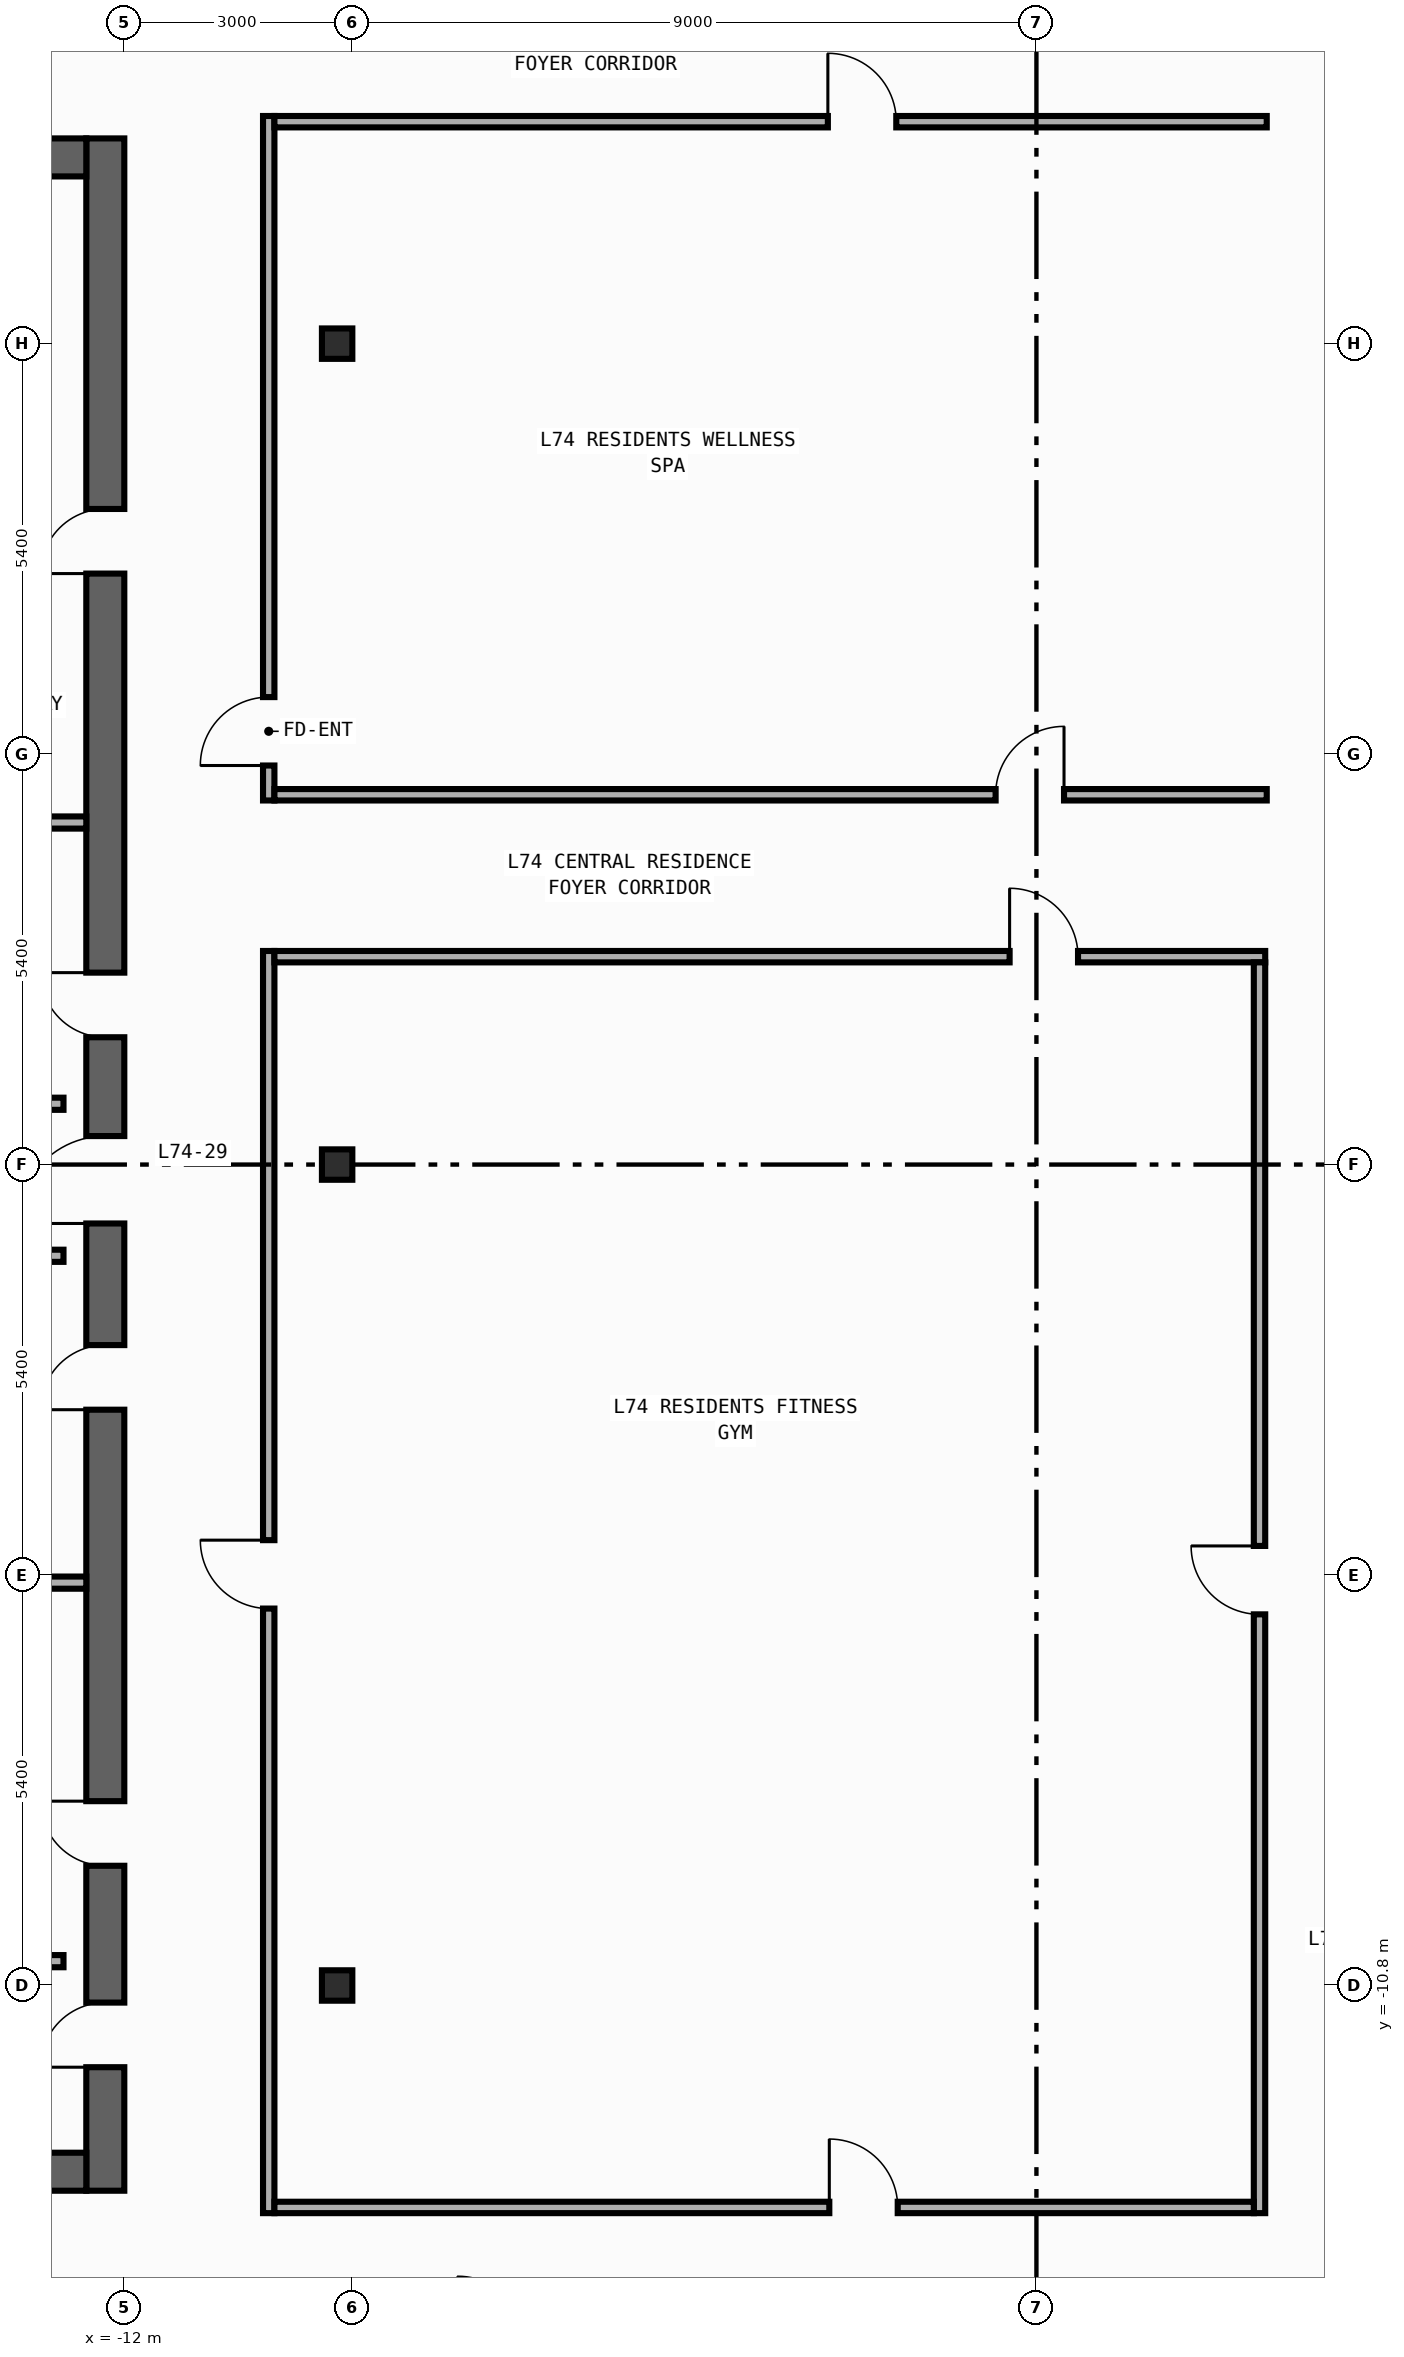
"""IFC4 building model, lengths in metres.
Left out: names, types, materials, properties, quantities, classifications, styles, units other than length and angle.
Written with IfcOpenShell. Run it as: python <this file> out.ifc"""

import sys

from ifc_helpers import new_model, si_unit, direction, frame, frame_2d, origin, origin_2d, place, context, subcontext, project, spatial, rectangle, i_section, extrude, element, fill, save


model = new_model("IFC4")
c1 = context("Model", 3, precision=1e-05, world=origin(), true_north=direction((0.0, 1.0)))
c2 = subcontext(c1, "Body", "Model", "MODEL_VIEW")
j1 = project(units=[si_unit("LENGTHUNIT", "METRE"), si_unit("PLANEANGLEUNIT", "RADIAN")], contexts=[c1])
p1 = place(None, origin())
s1 = spatial("IfcSite", under=j1, at=p1, CompositionType="ELEMENT")
p2 = place(p1, origin())
s2 = spatial("IfcBuilding", under=s1, at=p2, CompositionType="ELEMENT")
p3 = place(p2, frame((0.0, 0.0, 308.0)))
s3 = spatial("IfcBuildingStorey", under=s2, at=p3, CompositionType="ELEMENT", Elevation=308.0)
p4 = place(p3, frame((-12.25, -13.5, 0.0), z_axis=(0.0, 0.0, 1.0), x_axis=(0.0, 1.0, 0.0)))
e1 = element("IfcWall", 1, at=p4, inside=s3, PredefinedType="SHEAR", context=c2, shape_type="SweptSolid", body=[
    extrude(rectangle(XDim=27.0, YDim=0.5, at=frame_2d((13.5, 0.0))), origin(), (0.0, 0.0, 1.0), 3.54),
])
p5 = place(p4, frame((15.175, 0.0, 0.0)))
e2 = element("IfcOpeningElement", 2, at=p5, cuts=e1, PredefinedType="OPENING", context=c2, shape_type="SweptSolid", body=[
    extrude(rectangle(XDim=0.85, YDim=2.1, at=frame_2d((0.425, 1.05))), frame((0.0, 0.26, 0.0), z_axis=(0.0, -1.0, 0.0), x_axis=(1.0, 0.0, 0.0)), (0.0, 0.0, 1.0), 0.52),
])
p6 = place(p4, frame((21.275, 0.0, 0.0)))
e3 = element("IfcOpeningElement", 3, at=p6, cuts=e1, PredefinedType="OPENING", context=c2, shape_type="SweptSolid", body=[
    extrude(rectangle(XDim=0.85, YDim=2.1, at=frame_2d((0.425, 1.05))), frame((0.0, 0.26, 0.0), z_axis=(0.0, -1.0, 0.0), x_axis=(1.0, 0.0, 0.0)), (0.0, 0.0, 1.0), 0.52),
])
p7 = place(p4, frame((4.275, 0.0, 0.0)))
e4 = element("IfcOpeningElement", 4, at=p7, cuts=e1, PredefinedType="OPENING", context=c2, shape_type="SweptSolid", body=[
    extrude(rectangle(XDim=0.85, YDim=2.1, at=frame_2d((0.425, 1.05))), frame((0.0, 0.26, 0.0), z_axis=(0.0, -1.0, 0.0), x_axis=(1.0, 0.0, 0.0)), (0.0, 0.0, 1.0), 0.52),
])
p8 = place(p4, frame((10.275, 0.0, 0.0)))
e5 = element("IfcOpeningElement", 5, at=p8, cuts=e1, PredefinedType="OPENING", context=c2, shape_type="SweptSolid", body=[
    extrude(rectangle(XDim=0.85, YDim=2.1, at=frame_2d((0.425, 1.05))), frame((0.0, 0.26, 0.0), z_axis=(0.0, -1.0, 0.0), x_axis=(1.0, 0.0, 0.0)), (0.0, 0.0, 1.0), 0.52),
])
p9 = place(p4, frame((12.725, 0.0, 0.0)))
e6 = element("IfcOpeningElement", 6, at=p9, cuts=e1, PredefinedType="OPENING", context=c2, shape_type="SweptSolid", body=[
    extrude(rectangle(XDim=1.15, YDim=2.2, at=frame_2d((0.575, 1.1))), frame((0.0, 0.26, 0.0), z_axis=(0.0, -1.0, 0.0), x_axis=(1.0, 0.0, 0.0)), (0.0, 0.0, 1.0), 0.52),
])
p10 = place(p4, frame((1.625, 0.0, 0.0)))
e7 = element("IfcOpeningElement", 7, at=p10, cuts=e1, PredefinedType="OPENING", context=c2, shape_type="SweptSolid", body=[
    extrude(rectangle(XDim=0.85, YDim=2.1, at=frame_2d((0.425, 1.05))), frame((0.0, 0.26, 0.0), z_axis=(0.0, -1.0, 0.0), x_axis=(1.0, 0.0, 0.0)), (0.0, 0.0, 1.0), 0.52),
])
for number, where, z_axis, x_axis in (
    (8, (-19.9, -13.25, 0.0), (0.0, 0.0, 1.0), (1.0, 0.0, 0.0)),
    (9, (-19.9, 13.25, 0.0), (0.0, 0.0, 1.0), (1.0, 0.0, 0.0)),
):
    element("IfcWall", number, at=place(p3, frame(where, z_axis=z_axis, x_axis=x_axis)), inside=s3, PredefinedType="SHEAR", context=c2, shape_type="SweptSolid", body=[
        extrude(rectangle(XDim=7.4, YDim=0.5, at=frame_2d((3.7, 0.0))), origin(), (0.0, 0.0, 1.0), 3.54),
    ])
for number, where, z_axis, x_axis in (
    (10, (-9.2, -10.8, 0.0), (0.0, 0.0, 1.0), (1.0, 0.0, 0.0)),
    (11, (-9.2, 0.0, 0.0), (0.0, 0.0, 1.0), (1.0, 0.0, 0.0)),
    (12, (-9.2, 10.8, 0.0), (0.0, 0.0, 1.0), (1.0, 0.0, 0.0)),
):
    element("IfcColumn", number, at=place(p3, frame(where, z_axis=z_axis, x_axis=x_axis)), inside=s3, PredefinedType="COLUMN", context=c2, shape_type="SweptSolid", body=[
        extrude(i_section(OverallWidth=0.4, OverallDepth=0.4, WebThickness=0.013, FlangeThickness=0.021, FilletRadius=0.022, at=origin_2d()), origin(), (0.0, 0.0, 1.0), 3.8),
    ])
for number, where, z_axis, x_axis in (
    (13, (-15.4, 0.8, 0.0), (0.0, 0.0, 1.0), (1.0, 0.0, 0.0)),
    (14, (-15.4, -1.2, 0.0), (0.0, 0.0, 1.0), (1.0, 0.0, 0.0)),
    (15, (-15.4, -10.48, 0.0), (0.0, 0.0, 1.0), (1.0, 0.0, 0.0)),
):
    element("IfcWall", number, at=place(p3, frame(where, z_axis=z_axis, x_axis=x_axis)), inside=s3, PredefinedType="STANDARD", context=c2, shape_type="SweptSolid", body=[
        extrude(rectangle(XDim=2.6, YDim=0.16, at=frame_2d((1.3, 0.0))), origin(), (0.0, 0.0, 1.0), 3.54),
    ])
for number, where, z_axis, x_axis in (
    (16, (-15.4, 4.5, 0.0), (0.0, 0.0, 1.0), (1.0, 0.0, 0.0)),
    (17, (-15.4, -5.5, 0.0), (0.0, 0.0, 1.0), (1.0, 0.0, 0.0)),
):
    element("IfcWall", number, at=place(p3, frame(where, z_axis=z_axis, x_axis=x_axis)), inside=s3, PredefinedType="PARTITIONING", context=c2, shape_type="SweptSolid", body=[
        extrude(rectangle(XDim=2.9, YDim=0.16, at=frame_2d((1.45, 0.0))), origin(), (0.0, 0.0, 1.0), 3.54),
    ])
p11 = place(p3, frame((-10.1, 4.79, 0.0), z_axis=(0.0, 0.0, 1.0), x_axis=(0.0, 1.0, 0.0)))
e18 = element("IfcWall", 18, at=p11, inside=s3, PredefinedType="PARTITIONING", context=c2, shape_type="SweptSolid", body=[
    extrude(rectangle(XDim=9.005, YDim=0.15, at=frame_2d((4.502, 0.0))), origin(), (0.0, 0.0, 1.0), 3.54),
])
p12 = place(p11, frame((0.46, 0.0, 0.0)))
e19 = element("IfcOpeningElement", 19, at=p12, cuts=e18, PredefinedType="OPENING", context=c2, shape_type="SweptSolid", body=[
    extrude(rectangle(XDim=0.9, YDim=2.15, at=frame_2d((0.45, 1.075))), frame((0.0, 0.085, 0.0), z_axis=(0.0, -1.0, 0.0), x_axis=(1.0, 0.0, 0.0)), (0.0, 0.0, 1.0), 0.17),
])
p13 = place(p3, frame((-10.1, -13.795, 0.0), z_axis=(0.0, 0.0, 1.0), x_axis=(0.0, 1.0, 0.0)))
e20 = element("IfcWall", 20, at=p13, inside=s3, PredefinedType="PARTITIONING", context=c2, shape_type="SweptSolid", body=[
    extrude(rectangle(XDim=16.605, YDim=0.15, at=frame_2d((8.302, 0.0))), origin(), (0.0, 0.0, 1.0), 3.54),
])
p14 = place(p13, frame((7.954, 0.0, 0.0)))
e21 = element("IfcOpeningElement", 21, at=p14, cuts=e20, PredefinedType="OPENING", context=c2, shape_type="SweptSolid", body=[
    extrude(rectangle(XDim=0.9, YDim=2.15, at=frame_2d((0.45, 1.075))), frame((0.0, 0.085, 0.0), z_axis=(0.0, -1.0, 0.0), x_axis=(1.0, 0.0, 0.0)), (0.0, 0.0, 1.0), 0.17),
])
p15 = place(p3, frame((-10.025, 4.865, 0.0), z_axis=(0.0, 0.0, 1.0), x_axis=(1.0, 0.0, 0.0)))
e22 = element("IfcWall", 22, at=p15, inside=s3, PredefinedType="PARTITIONING", context=c2, shape_type="SweptSolid", body=[
    extrude(rectangle(XDim=13.055, YDim=0.15, at=frame_2d((6.527, 0.0))), origin(), (0.0, 0.0, 1.0), 3.54),
])
p16 = place(p15, frame((9.488, 0.0, 0.0)))
e23 = element("IfcOpeningElement", 23, at=p16, cuts=e22, PredefinedType="OPENING", context=c2, shape_type="SweptSolid", body=[
    extrude(rectangle(XDim=0.9, YDim=2.15, at=frame_2d((0.45, 1.075))), frame((0.0, 0.085, 0.0), z_axis=(0.0, -1.0, 0.0), x_axis=(1.0, 0.0, 0.0)), (0.0, 0.0, 1.0), 0.17),
])
p17 = place(p3, frame((-10.025, 2.735, 0.0), z_axis=(0.0, 0.0, 1.0), x_axis=(1.0, 0.0, 0.0)))
e24 = element("IfcWall", 24, at=p17, inside=s3, PredefinedType="PARTITIONING", context=c2, shape_type="SweptSolid", body=[
    extrude(rectangle(XDim=13.035, YDim=0.15, at=frame_2d((6.518, 0.0))), origin(), (0.0, 0.0, 1.0), 3.54),
])
p18 = place(p17, frame((9.672, 0.0, 0.0)))
e25 = element("IfcOpeningElement", 25, at=p18, cuts=e24, PredefinedType="OPENING", context=c2, shape_type="SweptSolid", body=[
    extrude(rectangle(XDim=0.9, YDim=2.15, at=frame_2d((0.45, 1.075))), frame((0.0, 0.085, 0.0), z_axis=(0.0, -1.0, 0.0), x_axis=(1.0, 0.0, 0.0)), (0.0, 0.0, 1.0), 0.17),
])
p19 = place(p3, frame((2.935, -13.795, 0.0), z_axis=(0.0, 0.0, 1.0), x_axis=(0.0, 1.0, 0.0)))
e26 = element("IfcWall", 26, at=p19, inside=s3, PredefinedType="PARTITIONING", context=c2, shape_type="SweptSolid", body=[
    extrude(rectangle(XDim=16.455, YDim=0.15, at=frame_2d((8.228, 0.0))), origin(), (0.0, 0.0, 1.0), 3.54),
])
p20 = place(p19, frame((7.878, 0.0, 0.0)))
e27 = element("IfcOpeningElement", 27, at=p20, cuts=e26, PredefinedType="OPENING", context=c2, shape_type="SweptSolid", body=[
    extrude(rectangle(XDim=0.9, YDim=2.15, at=frame_2d((0.45, 1.075))), frame((0.0, 0.085, 0.0), z_axis=(0.0, -1.0, 0.0), x_axis=(1.0, 0.0, 0.0)), (0.0, 0.0, 1.0), 0.17),
])
p21 = place(p3, frame((-10.025, 13.72, 0.0), z_axis=(0.0, 0.0, 1.0), x_axis=(1.0, 0.0, 0.0)))
e28 = element("IfcWall", 28, at=p21, inside=s3, PredefinedType="PARTITIONING", context=c2, shape_type="SweptSolid", body=[
    extrude(rectangle(XDim=13.055, YDim=0.15, at=frame_2d((6.527, 0.0))), origin(), (0.0, 0.0, 1.0), 3.54),
])
p22 = place(p21, frame((7.281, 0.0, 0.0)))
e29 = element("IfcOpeningElement", 29, at=p22, cuts=e28, PredefinedType="OPENING", context=c2, shape_type="SweptSolid", body=[
    extrude(rectangle(XDim=0.9, YDim=2.15, at=frame_2d((0.45, 1.075))), frame((0.0, 0.085, 0.0), z_axis=(0.0, -1.0, 0.0), x_axis=(1.0, 0.0, 0.0)), (0.0, 0.0, 1.0), 0.17),
])
p23 = place(p3, frame((-10.025, -13.72, 0.0), z_axis=(0.0, 0.0, 1.0), x_axis=(1.0, 0.0, 0.0)))
e30 = element("IfcWall", 30, at=p23, inside=s3, PredefinedType="PARTITIONING", context=c2, shape_type="SweptSolid", body=[
    extrude(rectangle(XDim=12.885, YDim=0.15, at=frame_2d((6.442, 0.0))), origin(), (0.0, 0.0, 1.0), 3.54),
])
p24 = place(p23, frame((7.3, 0.0, 0.0)))
e31 = element("IfcOpeningElement", 31, at=p24, cuts=e30, PredefinedType="OPENING", context=c2, shape_type="SweptSolid", body=[
    extrude(rectangle(XDim=0.9, YDim=2.15, at=frame_2d((0.45, 1.075))), frame((0.0, 0.085, 0.0), z_axis=(0.0, -1.0, 0.0), x_axis=(1.0, 0.0, 0.0)), (0.0, 0.0, 1.0), 0.17),
])
p25 = place(p5, origin())
e32 = element("IfcDoor", 32, at=p25, inside=s3, OperationType="SINGLE_SWING_RIGHT", PredefinedType="DOOR", context=c2, shape_type="SweptSolid", body=[
    extrude(rectangle(XDim=0.85, YDim=2.1, at=frame_2d((0.425, 1.05))), frame((0.0, 0.025, 0.0), z_axis=(0.0, -1.0, 0.0), x_axis=(1.0, 0.0, 0.0)), (0.0, 0.0, 1.0), 0.05),
])
fill(e2, e32)
p26 = place(p6, origin())
e33 = element("IfcDoor", 33, at=p26, inside=s3, OperationType="SINGLE_SWING_LEFT", PredefinedType="DOOR", context=c2, shape_type="SweptSolid", body=[
    extrude(rectangle(XDim=0.85, YDim=2.1, at=frame_2d((0.425, 1.05))), frame((0.0, 0.025, 0.0), z_axis=(0.0, -1.0, 0.0), x_axis=(1.0, 0.0, 0.0)), (0.0, 0.0, 1.0), 0.05),
])
fill(e3, e33)
p27 = place(p7, origin())
e34 = element("IfcDoor", 34, at=p27, inside=s3, OperationType="SINGLE_SWING_RIGHT", PredefinedType="DOOR", context=c2, shape_type="SweptSolid", body=[
    extrude(rectangle(XDim=0.85, YDim=2.1, at=frame_2d((0.425, 1.05))), frame((0.0, 0.025, 0.0), z_axis=(0.0, -1.0, 0.0), x_axis=(1.0, 0.0, 0.0)), (0.0, 0.0, 1.0), 0.05),
])
fill(e4, e34)
p28 = place(p8, origin())
e35 = element("IfcDoor", 35, at=p28, inside=s3, OperationType="SINGLE_SWING_LEFT", PredefinedType="DOOR", context=c2, shape_type="SweptSolid", body=[
    extrude(rectangle(XDim=0.85, YDim=2.1, at=frame_2d((0.425, 1.05))), frame((0.0, 0.025, 0.0), z_axis=(0.0, -1.0, 0.0), x_axis=(1.0, 0.0, 0.0)), (0.0, 0.0, 1.0), 0.05),
])
fill(e5, e35)
p29 = place(p9, origin())
e36 = element("IfcDoor", 36, at=p29, inside=s3, OperationType="SINGLE_SWING_LEFT", PredefinedType="DOOR", context=c2, shape_type="SweptSolid", body=[
    extrude(rectangle(XDim=1.15, YDim=2.2, at=frame_2d((0.575, 1.1))), frame((0.0, 0.025, 0.0), z_axis=(0.0, -1.0, 0.0), x_axis=(1.0, 0.0, 0.0)), (0.0, 0.0, 1.0), 0.05),
])
fill(e6, e36)
p30 = place(p10, origin())
e37 = element("IfcDoor", 37, at=p30, inside=s3, OperationType="SINGLE_SWING_LEFT", PredefinedType="DOOR", context=c2, shape_type="SweptSolid", body=[
    extrude(rectangle(XDim=0.85, YDim=2.1, at=frame_2d((0.425, 1.05))), frame((0.0, 0.025, 0.0), z_axis=(0.0, -1.0, 0.0), x_axis=(1.0, 0.0, 0.0)), (0.0, 0.0, 1.0), 0.05),
])
fill(e7, e37)
p31 = place(p12, origin())
e38 = element("IfcDoor", 38, at=p31, inside=s3, OperationType="SINGLE_SWING_LEFT", PredefinedType="DOOR", context=c2, shape_type="SweptSolid", body=[
    extrude(rectangle(XDim=0.9, YDim=2.15, at=frame_2d((0.45, 1.075))), frame((0.0, 0.025, 0.0), z_axis=(0.0, -1.0, 0.0), x_axis=(1.0, 0.0, 0.0)), (0.0, 0.0, 1.0), 0.05),
])
fill(e19, e38)
p32 = place(p14, origin())
e39 = element("IfcDoor", 39, at=p32, inside=s3, OperationType="SINGLE_SWING_RIGHT", PredefinedType="DOOR", context=c2, shape_type="SweptSolid", body=[
    extrude(rectangle(XDim=0.9, YDim=2.15, at=frame_2d((0.45, 1.075))), frame((0.0, 0.025, 0.0), z_axis=(0.0, -1.0, 0.0), x_axis=(1.0, 0.0, 0.0)), (0.0, 0.0, 1.0), 0.05),
])
fill(e21, e39)
p33 = place(p16, origin())
e40 = element("IfcDoor", 40, at=p33, inside=s3, OperationType="SINGLE_SWING_RIGHT", PredefinedType="DOOR", context=c2, shape_type="SweptSolid", body=[
    extrude(rectangle(XDim=0.9, YDim=2.15, at=frame_2d((0.45, 1.075))), frame((0.0, 0.025, 0.0), z_axis=(0.0, -1.0, 0.0), x_axis=(1.0, 0.0, 0.0)), (0.0, 0.0, 1.0), 0.05),
])
fill(e23, e40)
p34 = place(p18, origin())
e41 = element("IfcDoor", 41, at=p34, inside=s3, OperationType="SINGLE_SWING_LEFT", PredefinedType="DOOR", context=c2, shape_type="SweptSolid", body=[
    extrude(rectangle(XDim=0.9, YDim=2.15, at=frame_2d((0.45, 1.075))), frame((0.0, 0.025, 0.0), z_axis=(0.0, -1.0, 0.0), x_axis=(1.0, 0.0, 0.0)), (0.0, 0.0, 1.0), 0.05),
])
fill(e25, e41)
p35 = place(p20, origin())
e42 = element("IfcDoor", 42, at=p35, inside=s3, OperationType="SINGLE_SWING_RIGHT", PredefinedType="DOOR", context=c2, shape_type="SweptSolid", body=[
    extrude(rectangle(XDim=0.9, YDim=2.15, at=frame_2d((0.45, 1.075))), frame((0.0, 0.025, 0.0), z_axis=(0.0, -1.0, 0.0), x_axis=(1.0, 0.0, 0.0)), (0.0, 0.0, 1.0), 0.05),
])
fill(e27, e42)
p36 = place(p22, origin())
e43 = element("IfcDoor", 43, at=p36, inside=s3, OperationType="SINGLE_SWING_LEFT", PredefinedType="DOOR", context=c2, shape_type="SweptSolid", body=[
    extrude(rectangle(XDim=0.9, YDim=2.15, at=frame_2d((0.45, 1.075))), frame((0.0, 0.025, 0.0), z_axis=(0.0, -1.0, 0.0), x_axis=(1.0, 0.0, 0.0)), (0.0, 0.0, 1.0), 0.05),
])
fill(e29, e43)
p37 = place(p24, origin())
e44 = element("IfcDoor", 44, at=p37, inside=s3, OperationType="SINGLE_SWING_LEFT", PredefinedType="DOOR", context=c2, shape_type="SweptSolid", body=[
    extrude(rectangle(XDim=0.9, YDim=2.15, at=frame_2d((0.45, 1.075))), frame((0.0, 0.025, 0.0), z_axis=(0.0, -1.0, 0.0), x_axis=(1.0, 0.0, 0.0)), (0.0, 0.0, 1.0), 0.05),
])
fill(e31, e44)
save(model, sys.argv[1])
